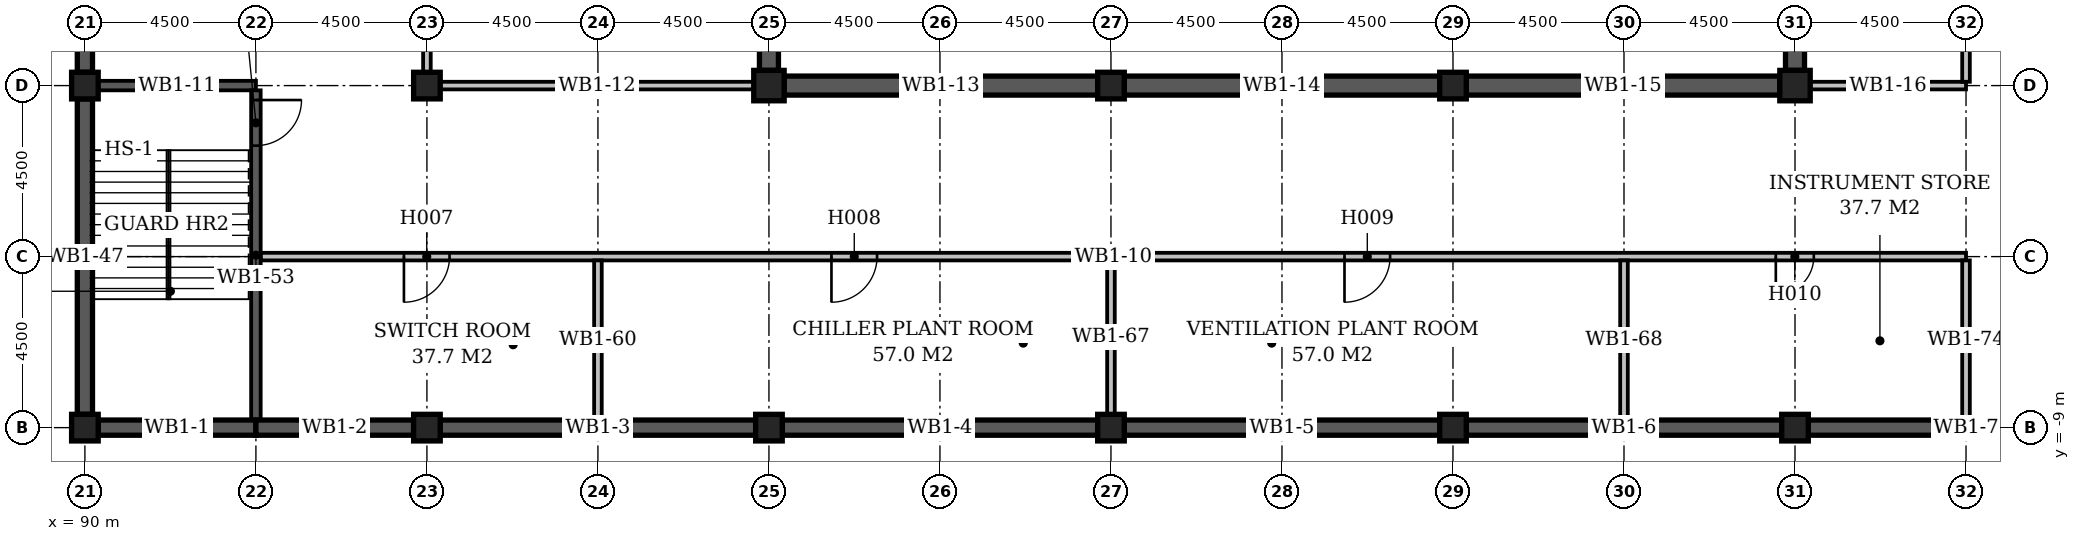
"""IFC4 building model, lengths in metres.
Left out: names, types, materials, properties, quantities, classifications, styles, units other than length and angle.
Written with IfcOpenShell. Run it as: python <this file> out.ifc"""

import sys

from ifc_helpers import new_model, si_unit, direction, frame, frame_2d, origin, origin_2d, place, context, subcontext, project, spatial, rectangle, extrude, element, fill, save


model = new_model("IFC4")
c1 = context("Model", 3, precision=1e-05, world=origin(), true_north=direction((0.0, 1.0)))
c2 = subcontext(c1, "Body", "Model", "MODEL_VIEW")
j1 = project(units=[si_unit("LENGTHUNIT", "METRE"), si_unit("PLANEANGLEUNIT", "RADIAN")], contexts=[c1])
p1 = place(None, origin())
s1 = spatial("IfcSite", under=j1, at=p1, CompositionType="ELEMENT")
p2 = place(p1, origin())
s2 = spatial("IfcBuilding", under=s1, at=p2, CompositionType="ELEMENT")
p3 = place(p2, frame((0.0, 0.0, -4.5)))
s3 = spatial("IfcBuildingStorey", under=s2, at=p3, CompositionType="ELEMENT", Elevation=-4.5)
for number, where, z_axis, x_axis in (
    (1, (90.0, -9.0, 0.0), (0.0, 0.0, 1.0), (1.0, 0.0, 0.0)),
    (2, (90.0, 0.0, 0.0), (0.0, 0.0, 1.0), (1.0, 0.0, 0.0)),
    (3, (99.0, -9.0, 0.0), (0.0, 0.0, 1.0), (1.0, 0.0, 0.0)),
    (4, (99.0, 0.0, 0.0), (0.0, 0.0, 1.0), (1.0, 0.0, 0.0)),
    (5, (108.0, -9.0, 0.0), (0.0, 0.0, 1.0), (1.0, 0.0, 0.0)),
):
    element("IfcColumn", number, at=place(p3, frame(where, z_axis=z_axis, x_axis=x_axis)), inside=s3, PredefinedType="COLUMN", context=c2, shape_type="SweptSolid", body=[
        extrude(rectangle(XDim=0.7, YDim=0.7, at=origin_2d()), origin(), (0.0, 0.0, 1.0), 4.2),
    ])
p4 = place(p3, frame((108.0, 0.0, 0.0), z_axis=(0.0, 0.0, 1.0), x_axis=(1.0, 0.0, 0.0)))
e6 = element("IfcColumn", 6, at=p4, inside=s3, PredefinedType="COLUMN", context=c2, shape_type="SweptSolid", body=[
    extrude(rectangle(XDim=0.8, YDim=0.8, at=origin_2d()), origin(), (0.0, 0.0, 1.0), 4.2),
])
for number, where, z_axis, x_axis in (
    (7, (117.0, -9.0, 0.0), (0.0, 0.0, 1.0), (1.0, 0.0, 0.0)),
    (8, (117.0, 0.0, 0.0), (0.0, 0.0, 1.0), (1.0, 0.0, 0.0)),
    (9, (126.0, -9.0, 0.0), (0.0, 0.0, 1.0), (1.0, 0.0, 0.0)),
    (10, (126.0, 0.0, 0.0), (0.0, 0.0, 1.0), (1.0, 0.0, 0.0)),
    (11, (135.0, -9.0, 0.0), (0.0, 0.0, 1.0), (1.0, 0.0, 0.0)),
):
    element("IfcColumn", number, at=place(p3, frame(where, z_axis=z_axis, x_axis=x_axis)), inside=s3, PredefinedType="COLUMN", context=c2, shape_type="SweptSolid", body=[
        extrude(rectangle(XDim=0.7, YDim=0.7, at=origin_2d()), origin(), (0.0, 0.0, 1.0), 4.2),
    ])
p5 = place(p3, frame((135.0, 0.0, 0.0), z_axis=(0.0, 0.0, 1.0), x_axis=(1.0, 0.0, 0.0)))
e12 = element("IfcColumn", 12, at=p5, inside=s3, PredefinedType="COLUMN", context=c2, shape_type="SweptSolid", body=[
    extrude(rectangle(XDim=0.8, YDim=0.8, at=origin_2d()), origin(), (0.0, 0.0, 1.0), 4.2),
])
p6 = place(p3, frame((90.35, -9.0, 0.0), z_axis=(0.0, 0.0, 1.0), x_axis=(1.0, 0.0, 0.0)))
e13 = element("IfcWall", 13, at=p6, inside=s3, PredefinedType="STANDARD", context=c2, shape_type="SweptSolid", body=[
    extrude(rectangle(XDim=4.15, YDim=0.4, at=frame_2d((2.075, 0.0))), origin(), (0.0, 0.0, 1.0), 4.5),
])
p7 = place(p3, frame((94.5, -9.0, 0.0), z_axis=(0.0, 0.0, 1.0), x_axis=(1.0, 0.0, 0.0)))
e14 = element("IfcWall", 14, at=p7, inside=s3, PredefinedType="STANDARD", context=c2, shape_type="SweptSolid", body=[
    extrude(rectangle(XDim=4.15, YDim=0.4, at=frame_2d((2.075, 0.0))), origin(), (0.0, 0.0, 1.0), 4.2),
])
for number, where, z_axis, x_axis in (
    (15, (99.35, -9.0, 0.0), (0.0, 0.0, 1.0), (1.0, 0.0, 0.0)),
    (16, (108.35, -9.0, 0.0), (0.0, 0.0, 1.0), (1.0, 0.0, 0.0)),
    (17, (117.35, -9.0, 0.0), (0.0, 0.0, 1.0), (1.0, 0.0, 0.0)),
    (18, (126.35, -9.0, 0.0), (0.0, 0.0, 1.0), (1.0, 0.0, 0.0)),
    (19, (135.35, -9.0, 0.0), (0.0, 0.0, 1.0), (1.0, 0.0, 0.0)),
):
    element("IfcWall", number, at=place(p3, frame(where, z_axis=z_axis, x_axis=x_axis)), inside=s3, PredefinedType="STANDARD", context=c2, shape_type="SweptSolid", body=[
        extrude(rectangle(XDim=8.3, YDim=0.4, at=frame_2d((4.15, 0.0))), origin(), (0.0, 0.0, 1.0), 4.2),
    ])
p8 = place(p3, frame((94.625, -4.5, 0.0), z_axis=(0.0, 0.0, 1.0), x_axis=(1.0, 0.0, 0.0)))
e20 = element("IfcWall", 20, at=p8, inside=s3, PredefinedType="STANDARD", context=c2, shape_type="SweptSolid", body=[
    extrude(rectangle(XDim=44.875, YDim=0.2, at=frame_2d((22.438, 0.0))), origin(), (0.0, 0.0, 1.0), 4.2),
])
p9 = place(p8, frame((3.77, 0.0, 0.0)))
e21 = element("IfcOpeningElement", 21, at=p9, cuts=e20, PredefinedType="OPENING", context=c2, shape_type="SweptSolid", body=[
    extrude(rectangle(XDim=1.2, YDim=2.1, at=frame_2d((0.6, 1.05))), frame((0.0, 0.112, 0.0), z_axis=(0.0, -1.0, 0.0), x_axis=(1.0, 0.0, 0.0)), (0.0, 0.0, 1.0), 0.224),
])
p10 = place(p8, frame((15.02, 0.0, 0.0)))
e22 = element("IfcOpeningElement", 22, at=p10, cuts=e20, PredefinedType="OPENING", context=c2, shape_type="SweptSolid", body=[
    extrude(rectangle(XDim=1.2, YDim=2.1, at=frame_2d((0.6, 1.05))), frame((0.0, 0.112, 0.0), z_axis=(0.0, -1.0, 0.0), x_axis=(1.0, 0.0, 0.0)), (0.0, 0.0, 1.0), 0.224),
])
p11 = place(p8, frame((28.52, 0.0, 0.0)))
e23 = element("IfcOpeningElement", 23, at=p11, cuts=e20, PredefinedType="OPENING", context=c2, shape_type="SweptSolid", body=[
    extrude(rectangle(XDim=1.2, YDim=2.1, at=frame_2d((0.6, 1.05))), frame((0.0, 0.112, 0.0), z_axis=(0.0, -1.0, 0.0), x_axis=(1.0, 0.0, 0.0)), (0.0, 0.0, 1.0), 0.224),
])
p12 = place(p8, frame((39.87, 0.0, 0.0)))
e24 = element("IfcOpeningElement", 24, at=p12, cuts=e20, PredefinedType="OPENING", context=c2, shape_type="SweptSolid", body=[
    extrude(rectangle(XDim=1.0, YDim=2.1, at=frame_2d((0.5, 1.05))), frame((0.0, 0.112, 0.0), z_axis=(0.0, -1.0, 0.0), x_axis=(1.0, 0.0, 0.0)), (0.0, 0.0, 1.0), 0.224),
])
p13 = place(p3, frame((90.35, 0.0, 0.0), z_axis=(0.0, 0.0, 1.0), x_axis=(1.0, 0.0, 0.0)))
e25 = element("IfcWall", 25, at=p13, inside=s3, PredefinedType="STANDARD", context=c2, shape_type="SweptSolid", body=[
    extrude(rectangle(XDim=4.15, YDim=0.25, at=frame_2d((2.075, 0.0))), origin(), (0.0, 0.0, 1.0), 4.5),
])
p14 = place(p3, frame((99.35, 0.0, 0.0), z_axis=(0.0, 0.0, 1.0), x_axis=(1.0, 0.0, 0.0)))
e26 = element("IfcWall", 26, at=p14, inside=s3, PredefinedType="STANDARD", context=c2, shape_type="SweptSolid", body=[
    extrude(rectangle(XDim=8.25, YDim=0.2, at=frame_2d((4.125, 0.0))), origin(), (0.0, 0.0, 1.0), 4.2),
])
p15 = place(p3, frame((108.4, 0.0, 0.0), z_axis=(0.0, 0.0, 1.0), x_axis=(1.0, 0.0, 0.0)))
e27 = element("IfcWall", 27, at=p15, inside=s3, PredefinedType="STANDARD", context=c2, shape_type="SweptSolid", body=[
    extrude(rectangle(XDim=8.25, YDim=0.5, at=frame_2d((4.125, 0.0))), origin(), (0.0, 0.0, 1.0), 4.5),
])
p16 = place(p3, frame((117.35, 0.0, 0.0), z_axis=(0.0, 0.0, 1.0), x_axis=(1.0, 0.0, 0.0)))
e28 = element("IfcWall", 28, at=p16, inside=s3, PredefinedType="STANDARD", context=c2, shape_type="SweptSolid", body=[
    extrude(rectangle(XDim=8.3, YDim=0.5, at=frame_2d((4.15, 0.0))), origin(), (0.0, 0.0, 1.0), 4.5),
])
p17 = place(p3, frame((126.35, 0.0, 0.0), z_axis=(0.0, 0.0, 1.0), x_axis=(1.0, 0.0, 0.0)))
e29 = element("IfcWall", 29, at=p17, inside=s3, PredefinedType="STANDARD", context=c2, shape_type="SweptSolid", body=[
    extrude(rectangle(XDim=8.25, YDim=0.5, at=frame_2d((4.125, 0.0))), origin(), (0.0, 0.0, 1.0), 4.5),
])
p18 = place(p3, frame((135.4, 0.0, 0.0), z_axis=(0.0, 0.0, 1.0), x_axis=(1.0, 0.0, 0.0)))
e30 = element("IfcWall", 30, at=p18, inside=s3, PredefinedType="STANDARD", context=c2, shape_type="SweptSolid", body=[
    extrude(rectangle(XDim=4.1, YDim=0.2, at=frame_2d((2.05, 0.0))), origin(), (0.0, 0.0, 1.0), 4.2),
])
p19 = place(p3, frame((90.0, -8.65, 0.0), z_axis=(0.0, 0.0, 1.0), x_axis=(0.0, 1.0, 0.0)))
e31 = element("IfcWall", 31, at=p19, inside=s3, PredefinedType="STANDARD", context=c2, shape_type="SweptSolid", body=[
    extrude(rectangle(XDim=8.3, YDim=0.4, at=frame_2d((4.15, 0.0))), origin(), (0.0, 0.0, 1.0), 4.5),
])
p20 = place(p3, frame((90.0, 0.35, 0.0), z_axis=(0.0, 0.0, 1.0), x_axis=(0.0, 1.0, 0.0)))
e32 = element("IfcWall", 32, at=p20, inside=s3, PredefinedType="STANDARD", context=c2, shape_type="SweptSolid", body=[
    extrude(rectangle(XDim=8.3, YDim=0.4, at=frame_2d((4.15, 0.0))), origin(), (0.0, 0.0, 1.0), 4.2),
])
p21 = place(p3, frame((94.5, -8.8, 0.0), z_axis=(0.0, 0.0, 1.0), x_axis=(0.0, 1.0, 0.0)))
e33 = element("IfcWall", 33, at=p21, inside=s3, PredefinedType="STANDARD", context=c2, shape_type="SweptSolid", body=[
    extrude(rectangle(XDim=8.675, YDim=0.25, at=frame_2d((4.337, 0.0))), origin(), (0.0, 0.0, 1.0), 4.5),
])
p22 = place(p21, frame((7.22, 0.0, 0.0)))
e34 = element("IfcOpeningElement", 34, at=p22, cuts=e33, PredefinedType="OPENING", context=c2, shape_type="SweptSolid", body=[
    extrude(rectangle(XDim=1.2, YDim=2.1, at=frame_2d((0.6, 1.05))), frame((0.0, 0.137, 0.0), z_axis=(0.0, -1.0, 0.0), x_axis=(1.0, 0.0, 0.0)), (0.0, 0.0, 1.0), 0.274),
])
p23 = place(p3, frame((99.0, 0.35, 0.0), z_axis=(0.0, 0.0, 1.0), x_axis=(0.0, 1.0, 0.0)))
e35 = element("IfcWall", 35, at=p23, inside=s3, PredefinedType="STANDARD", context=c2, shape_type="SweptSolid", body=[
    extrude(rectangle(XDim=4.05, YDim=0.2, at=frame_2d((2.025, 0.0))), origin(), (0.0, 0.0, 1.0), 4.2),
])
p24 = place(p3, frame((103.5, -8.8, 0.0), z_axis=(0.0, 0.0, 1.0), x_axis=(0.0, 1.0, 0.0)))
e36 = element("IfcWall", 36, at=p24, inside=s3, PredefinedType="STANDARD", context=c2, shape_type="SweptSolid", body=[
    extrude(rectangle(XDim=4.2, YDim=0.2, at=frame_2d((2.1, 0.0))), origin(), (0.0, 0.0, 1.0), 4.2),
])
p25 = place(p3, frame((108.0, 0.4, 0.0), z_axis=(0.0, 0.0, 1.0), x_axis=(0.0, 1.0, 0.0)))
e37 = element("IfcWall", 37, at=p25, inside=s3, PredefinedType="STANDARD", context=c2, shape_type="SweptSolid", body=[
    extrude(rectangle(XDim=8.25, YDim=0.5, at=frame_2d((4.125, 0.0))), origin(), (0.0, 0.0, 1.0), 4.5),
])
p26 = place(p3, frame((117.0, -8.65, 0.0), z_axis=(0.0, 0.0, 1.0), x_axis=(0.0, 1.0, 0.0)))
e38 = element("IfcWall", 38, at=p26, inside=s3, PredefinedType="STANDARD", context=c2, shape_type="SweptSolid", body=[
    extrude(rectangle(XDim=4.05, YDim=0.2, at=frame_2d((2.025, 0.0))), origin(), (0.0, 0.0, 1.0), 4.2),
])
p27 = place(p3, frame((130.5, -8.8, 0.0), z_axis=(0.0, 0.0, 1.0), x_axis=(0.0, 1.0, 0.0)))
e39 = element("IfcWall", 39, at=p27, inside=s3, PredefinedType="STANDARD", context=c2, shape_type="SweptSolid", body=[
    extrude(rectangle(XDim=4.2, YDim=0.2, at=frame_2d((2.1, 0.0))), origin(), (0.0, 0.0, 1.0), 4.2),
])
p28 = place(p3, frame((135.0, 0.4, 0.0), z_axis=(0.0, 0.0, 1.0), x_axis=(0.0, 1.0, 0.0)))
e40 = element("IfcWall", 40, at=p28, inside=s3, PredefinedType="STANDARD", context=c2, shape_type="SweptSolid", body=[
    extrude(rectangle(XDim=8.25, YDim=0.5, at=frame_2d((4.125, 0.0))), origin(), (0.0, 0.0, 1.0), 4.5),
])
p29 = place(p3, frame((139.5, -8.8, 0.0), z_axis=(0.0, 0.0, 1.0), x_axis=(0.0, 1.0, 0.0)))
e41 = element("IfcWall", 41, at=p29, inside=s3, PredefinedType="STANDARD", context=c2, shape_type="SweptSolid", body=[
    extrude(rectangle(XDim=4.2, YDim=0.2, at=frame_2d((2.1, 0.0))), origin(), (0.0, 0.0, 1.0), 4.2),
])
p30 = place(p3, frame((139.5, 0.1, 0.0), z_axis=(0.0, 0.0, 1.0), x_axis=(0.0, 1.0, 0.0)))
e42 = element("IfcWall", 42, at=p30, inside=s3, PredefinedType="STANDARD", context=c2, shape_type="SweptSolid", body=[
    extrude(rectangle(XDim=35.775, YDim=0.2, at=frame_2d((17.887, 0.0))), origin(), (0.0, 0.0, 1.0), 4.2),
])
p31 = place(p30, frame((30.92, 0.0, 0.0)))
e43 = element("IfcOpeningElement", 43, at=p31, cuts=e42, PredefinedType="OPENING", context=c2, shape_type="SweptSolid", body=[
    extrude(rectangle(XDim=1.0, YDim=2.1, at=frame_2d((0.5, 1.05))), frame((0.0, 0.112, 0.0), z_axis=(0.0, -1.0, 0.0), x_axis=(1.0, 0.0, 0.0)), (0.0, 0.0, 1.0), 0.224),
])
p32 = place(p22, origin())
e44 = element("IfcDoor", 44, at=p32, inside=s3, OperationType="SINGLE_SWING_RIGHT", PredefinedType="DOOR", context=c2, shape_type="SweptSolid", body=[
    extrude(rectangle(XDim=1.2, YDim=2.1, at=frame_2d((0.6, 1.05))), frame((0.0, 0.025, 0.0), z_axis=(0.0, -1.0, 0.0), x_axis=(1.0, 0.0, 0.0)), (0.0, 0.0, 1.0), 0.05),
])
fill(e34, e44)
p33 = place(p9, frame((1.2, 0.0, 0.0), z_axis=(0.0, 0.0, 1.0), x_axis=(-1.0, 0.0, 0.0)))
e45 = element("IfcDoor", 45, at=p33, inside=s3, OperationType="SINGLE_SWING_RIGHT", PredefinedType="DOOR", context=c2, shape_type="SweptSolid", body=[
    extrude(rectangle(XDim=1.2, YDim=2.1, at=frame_2d((0.6, 1.05))), frame((0.0, 0.025, 0.0), z_axis=(0.0, -1.0, 0.0), x_axis=(1.0, 0.0, 0.0)), (0.0, 0.0, 1.0), 0.05),
])
fill(e21, e45)
p34 = place(p10, frame((1.2, 0.0, 0.0), z_axis=(0.0, 0.0, 1.0), x_axis=(-1.0, 0.0, 0.0)))
e46 = element("IfcDoor", 46, at=p34, inside=s3, OperationType="SINGLE_SWING_RIGHT", PredefinedType="DOOR", context=c2, shape_type="SweptSolid", body=[
    extrude(rectangle(XDim=1.2, YDim=2.1, at=frame_2d((0.6, 1.05))), frame((0.0, 0.025, 0.0), z_axis=(0.0, -1.0, 0.0), x_axis=(1.0, 0.0, 0.0)), (0.0, 0.0, 1.0), 0.05),
])
fill(e22, e46)
p35 = place(p11, frame((1.2, 0.0, 0.0), z_axis=(0.0, 0.0, 1.0), x_axis=(-1.0, 0.0, 0.0)))
e47 = element("IfcDoor", 47, at=p35, inside=s3, OperationType="SINGLE_SWING_RIGHT", PredefinedType="DOOR", context=c2, shape_type="SweptSolid", body=[
    extrude(rectangle(XDim=1.2, YDim=2.1, at=frame_2d((0.6, 1.05))), frame((0.0, 0.025, 0.0), z_axis=(0.0, -1.0, 0.0), x_axis=(1.0, 0.0, 0.0)), (0.0, 0.0, 1.0), 0.05),
])
fill(e23, e47)
p36 = place(p12, frame((1.0, 0.0, 0.0), z_axis=(0.0, 0.0, 1.0), x_axis=(-1.0, 0.0, 0.0)))
e48 = element("IfcDoor", 48, at=p36, inside=s3, OperationType="SINGLE_SWING_RIGHT", PredefinedType="DOOR", context=c2, shape_type="SweptSolid", body=[
    extrude(rectangle(XDim=1.0, YDim=2.1, at=frame_2d((0.5, 1.05))), frame((0.0, 0.025, 0.0), z_axis=(0.0, -1.0, 0.0), x_axis=(1.0, 0.0, 0.0)), (0.0, 0.0, 1.0), 0.05),
])
fill(e24, e48)
save(model, sys.argv[1])
